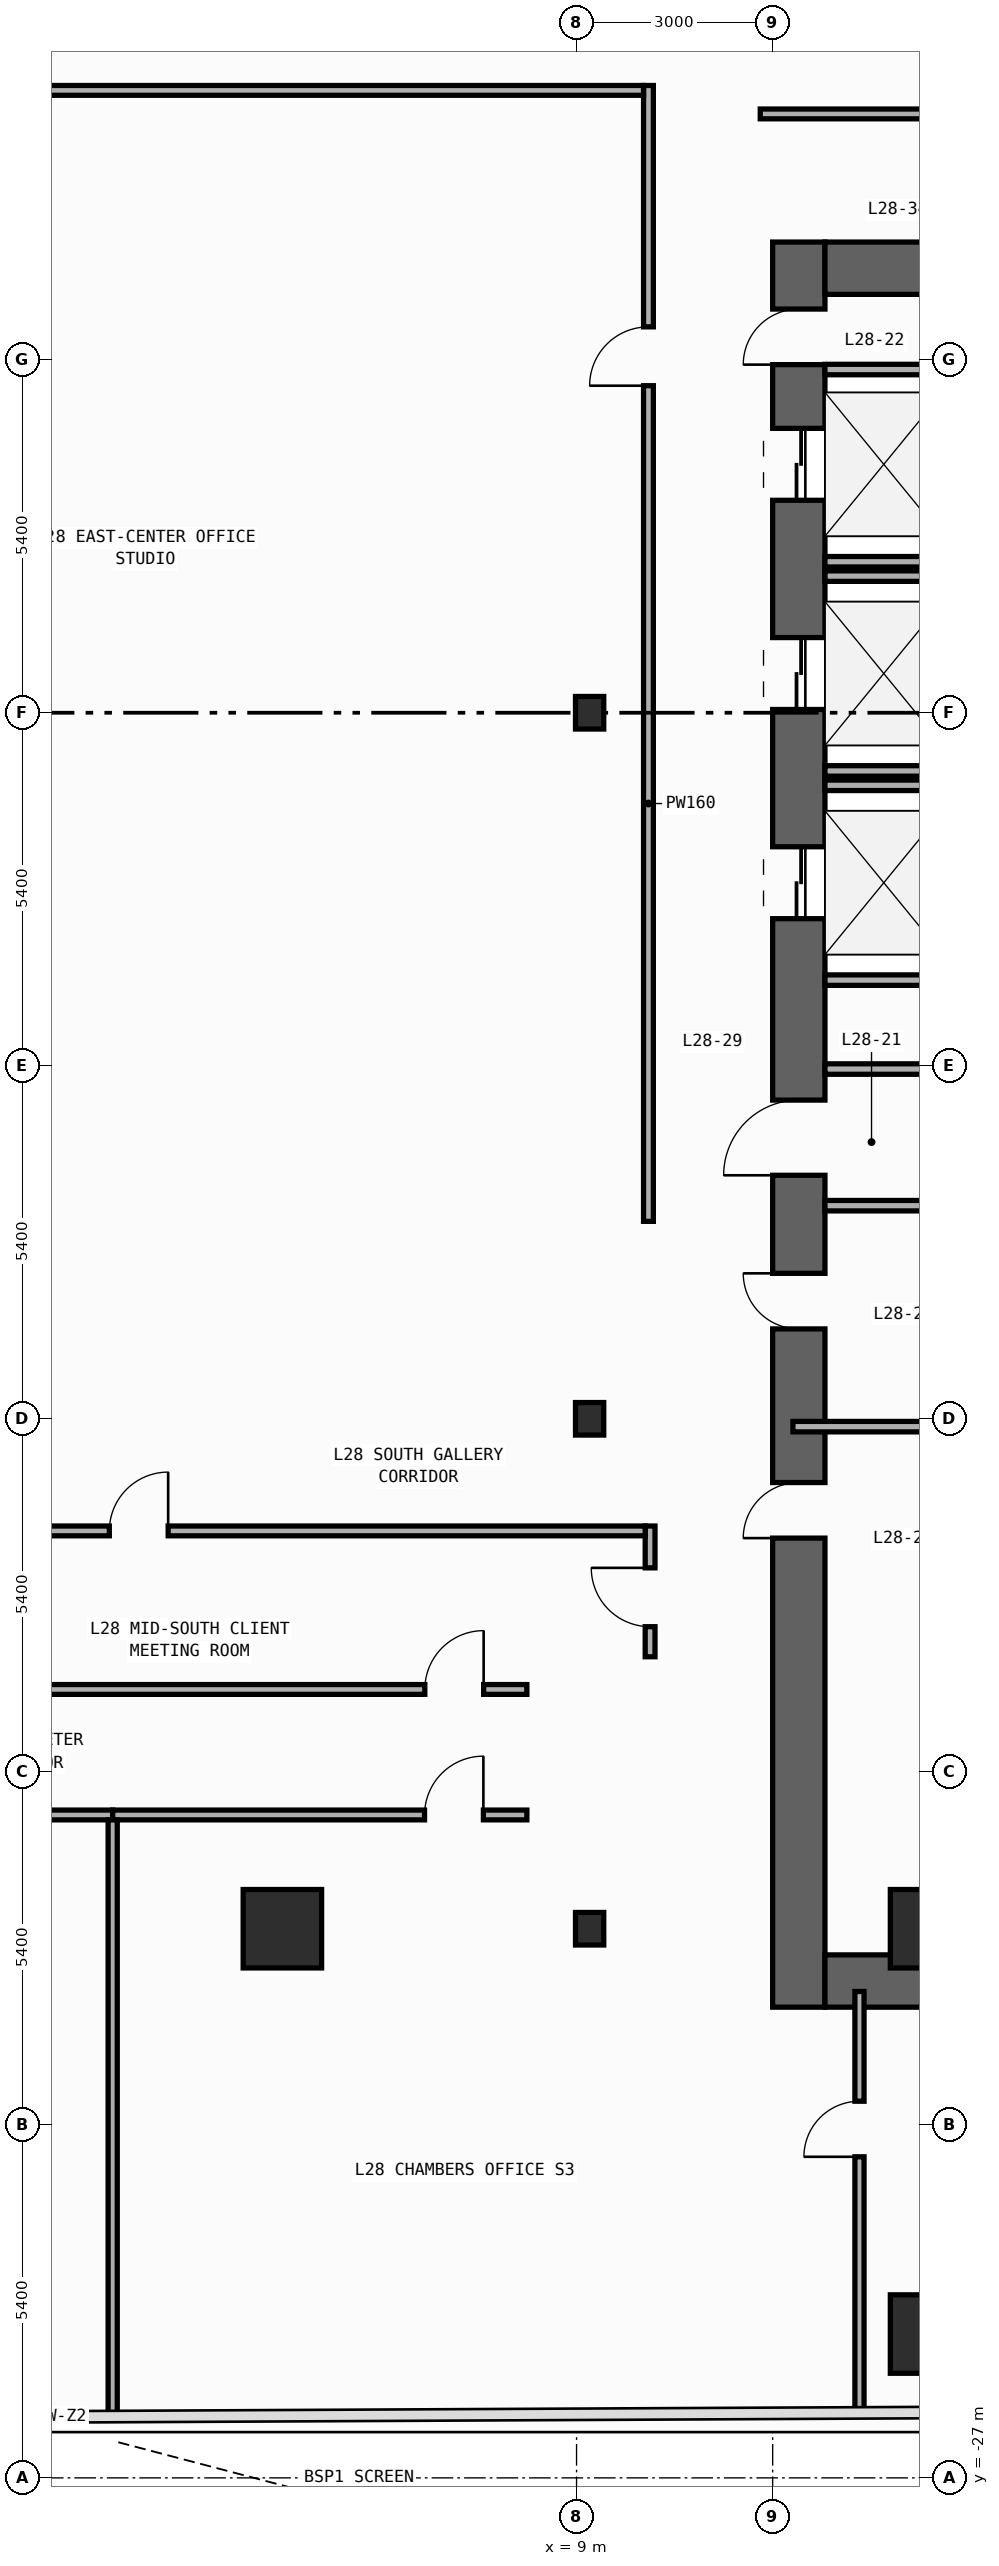
"""IFC4 building model, lengths in metres.
Left out: names, types, materials, properties, quantities, classifications, styles, units other than length and angle.
Written with IfcOpenShell. Run it as: python <this file> out.ifc"""

import sys

from ifc_helpers import new_model, si_unit, direction, frame, frame_2d, origin, origin_2d, place, context, subcontext, project, spatial, rectangle, i_section, extrude, element, fill, save


model = new_model("IFC4")
c1 = context("Model", 3, precision=1e-05, world=origin(), true_north=direction((0.0, 1.0)))
c2 = subcontext(c1, "Body", "Model", "MODEL_VIEW")
j1 = project(units=[si_unit("LENGTHUNIT", "METRE"), si_unit("PLANEANGLEUNIT", "RADIAN")], contexts=[c1])
p1 = place(None, origin())
s1 = spatial("IfcSite", under=j1, at=p1, CompositionType="ELEMENT")
p2 = place(p1, origin())
s2 = spatial("IfcBuilding", under=s1, at=p2, CompositionType="ELEMENT")
p3 = place(p2, frame((0.0, 0.0, 122.6)))
s3 = spatial("IfcBuildingStorey", under=s2, at=p3, CompositionType="ELEMENT", Elevation=122.6)
p4 = place(p3, frame((12.4, -19.8, 0.0), z_axis=(0.0, 0.0, 1.0), x_axis=(0.0, 1.0, 0.0)))
e1 = element("IfcWall", 1, at=p4, inside=s3, PredefinedType="SHEAR", context=c2, shape_type="SweptSolid", body=[
    extrude(rectangle(XDim=27.0, YDim=0.8, at=frame_2d((13.5, 0.0))), origin(), (0.0, 0.0, 1.0), 3.94),
])
p5 = place(p4, frame((23.05, 0.0, 0.0)))
e2 = element("IfcOpeningElement", 2, at=p5, cuts=e1, PredefinedType="OPENING", context=c2, shape_type="SweptSolid", body=[
    extrude(rectangle(XDim=1.1, YDim=2.2, at=frame_2d((0.55, 1.1))), frame((0.0, 0.41, 0.0), z_axis=(0.0, -1.0, 0.0), x_axis=(1.0, 0.0, 0.0)), (0.0, 0.0, 1.0), 0.82),
])
p6 = place(p4, frame((19.85, 0.0, 0.0)))
e3 = element("IfcOpeningElement", 3, at=p6, cuts=e1, PredefinedType="OPENING", context=c2, shape_type="SweptSolid", body=[
    extrude(rectangle(XDim=1.1, YDim=2.2, at=frame_2d((0.55, 1.1))), frame((0.0, 0.41, 0.0), z_axis=(0.0, -1.0, 0.0), x_axis=(1.0, 0.0, 0.0)), (0.0, 0.0, 1.0), 0.82),
])
p7 = place(p4, frame((16.65, 0.0, 0.0)))
e4 = element("IfcOpeningElement", 4, at=p7, cuts=e1, PredefinedType="OPENING", context=c2, shape_type="SweptSolid", body=[
    extrude(rectangle(XDim=1.1, YDim=2.2, at=frame_2d((0.55, 1.1))), frame((0.0, 0.41, 0.0), z_axis=(0.0, -1.0, 0.0), x_axis=(1.0, 0.0, 0.0)), (0.0, 0.0, 1.0), 0.82),
])
p8 = place(p4, frame((7.175, 0.0, 0.0)))
e5 = element("IfcOpeningElement", 5, at=p8, cuts=e1, PredefinedType="OPENING", context=c2, shape_type="SweptSolid", body=[
    extrude(rectangle(XDim=0.85, YDim=2.1, at=frame_2d((0.425, 1.05))), frame((0.0, 0.41, 0.0), z_axis=(0.0, -1.0, 0.0), x_axis=(1.0, 0.0, 0.0)), (0.0, 0.0, 1.0), 0.82),
])
p9 = place(p4, frame((10.375, 0.0, 0.0)))
e6 = element("IfcOpeningElement", 6, at=p9, cuts=e1, PredefinedType="OPENING", context=c2, shape_type="SweptSolid", body=[
    extrude(rectangle(XDim=0.85, YDim=2.1, at=frame_2d((0.425, 1.05))), frame((0.0, 0.41, 0.0), z_axis=(0.0, -1.0, 0.0), x_axis=(1.0, 0.0, 0.0)), (0.0, 0.0, 1.0), 0.82),
])
p10 = place(p4, frame((12.725, 0.0, 0.0)))
e7 = element("IfcOpeningElement", 7, at=p10, cuts=e1, PredefinedType="OPENING", context=c2, shape_type="SweptSolid", body=[
    extrude(rectangle(XDim=1.15, YDim=2.2, at=frame_2d((0.575, 1.1))), frame((0.0, 0.41, 0.0), z_axis=(0.0, -1.0, 0.0), x_axis=(1.0, 0.0, 0.0)), (0.0, 0.0, 1.0), 0.82),
])
p11 = place(p4, frame((25.125, 0.0, 0.0)))
e8 = element("IfcOpeningElement", 8, at=p11, cuts=e1, PredefinedType="OPENING", context=c2, shape_type="SweptSolid", body=[
    extrude(rectangle(XDim=0.85, YDim=2.1, at=frame_2d((0.425, 1.05))), frame((0.0, 0.41, 0.0), z_axis=(0.0, -1.0, 0.0), x_axis=(1.0, 0.0, 0.0)), (0.0, 0.0, 1.0), 0.82),
])
for number, where, z_axis, x_axis in (
    (9, (12.8, -19.4, 0.0), (0.0, 0.0, 1.0), (1.0, 0.0, 0.0)),
    (10, (12.8, 6.8, 0.0), (0.0, 0.0, 1.0), (1.0, 0.0, 0.0)),
):
    element("IfcWall", number, at=place(p3, frame(where, z_axis=z_axis, x_axis=x_axis)), inside=s3, PredefinedType="SHEAR", context=c2, shape_type="SweptSolid", body=[
        extrude(rectangle(XDim=6.8, YDim=0.8, at=frame_2d((3.4, 0.0))), origin(), (0.0, 0.0, 1.0), 3.94),
    ])
for number, where, z_axis, x_axis in (
    (11, (9.2, -18.6, 0.0), (0.0, 0.0, 1.0), (1.0, 0.0, 0.0)),
    (12, (9.2, -10.8, 0.0), (0.0, 0.0, 1.0), (1.0, 0.0, 0.0)),
    (13, (9.2, 0.0, 0.0), (0.0, 0.0, 1.0), (1.0, 0.0, 0.0)),
):
    element("IfcColumn", number, at=place(p3, frame(where, z_axis=z_axis, x_axis=x_axis)), inside=s3, PredefinedType="COLUMN", context=c2, shape_type="SweptSolid", body=[
        extrude(i_section(OverallWidth=0.432, OverallDepth=0.498, WebThickness=0.045, FlangeThickness=0.07, FilletRadius=0.022, at=origin_2d()), origin(), (0.0, 0.0, 1.0), 4.2),
    ])
for number, where, z_axis, x_axis in (
    (14, (14.4, -18.6, 0.0), (0.0, 0.0, 1.0), (1.0, 0.0, 0.0)),
    (15, (4.5, -18.6, 0.0), (0.0, 0.0, 1.0), (1.0, 0.0, 0.0)),
    (16, (14.4, -24.8, 0.0), (0.0, 0.0, 1.0), (1.0, 0.0, 0.0)),
):
    element("IfcColumn", number, at=place(p3, frame(where, z_axis=z_axis, x_axis=x_axis)), inside=s3, PredefinedType="COLUMN", context=c2, shape_type="SweptSolid", body=[
        extrude(rectangle(XDim=1.2, YDim=1.2, at=origin_2d()), origin(), (0.0, 0.0, 1.0), 4.2),
    ])
for number, where, z_axis, x_axis in (
    (17, (12.8, 2.31, 0.0), (0.0, 0.0, 1.0), (1.0, 0.0, 0.0)),
    (18, (12.8, -0.89, 0.0), (0.0, 0.0, 1.0), (1.0, 0.0, 0.0)),
    (19, (12.8, 2.09, 0.0), (0.0, 0.0, 1.0), (1.0, 0.0, 0.0)),
    (20, (12.8, -4.09, 0.0), (0.0, 0.0, 1.0), (1.0, 0.0, 0.0)),
    (21, (12.8, -1.11, 0.0), (0.0, 0.0, 1.0), (1.0, 0.0, 0.0)),
):
    element("IfcWall", number, at=place(p3, frame(where, z_axis=z_axis, x_axis=x_axis)), inside=s3, PredefinedType="STANDARD", context=c2, shape_type="SweptSolid", body=[
        extrude(rectangle(XDim=2.19, YDim=0.16, at=frame_2d((1.095, 0.0))), origin(), (0.0, 0.0, 1.0), 3.94),
    ])
for number, where, z_axis, x_axis in (
    (22, (12.8, -5.45, 0.0), (0.0, 0.0, 1.0), (1.0, 0.0, 0.0)),
    (23, (12.8, -7.54, 0.0), (0.0, 0.0, 1.0), (1.0, 0.0, 0.0)),
    (24, (12.8, 5.25, 0.0), (0.0, 0.0, 1.0), (1.0, 0.0, 0.0)),
):
    element("IfcWall", number, at=place(p3, frame(where, z_axis=z_axis, x_axis=x_axis)), inside=s3, PredefinedType="STANDARD", context=c2, shape_type="SweptSolid", body=[
        extrude(rectangle(XDim=2.6, YDim=0.16, at=frame_2d((1.3, 0.0))), origin(), (0.0, 0.0, 1.0), 3.94),
    ])
p12 = place(p3, frame((12.31, -10.92, 0.0), z_axis=(0.0, 0.0, 1.0), x_axis=(1.0, 0.0, 0.0)))
e25 = element("IfcWall", 25, at=p12, inside=s3, PredefinedType="PARTITIONING", context=c2, shape_type="SweptSolid", body=[
    extrude(rectangle(XDim=3.065, YDim=0.16, at=frame_2d((1.532, 0.0))), origin(), (0.0, 0.0, 1.0), 3.24),
])
p13 = place(p3, frame((10.1, -7.78, 0.0), z_axis=(0.0, 0.0, 1.0), x_axis=(0.0, 1.0, 0.0)))
e26 = element("IfcWall", 26, at=p13, inside=s3, PredefinedType="PARTITIONING", context=c2, shape_type="SweptSolid", body=[
    extrude(rectangle(XDim=17.375, YDim=0.15, at=frame_2d((8.688, 0.0))), origin(), (0.0, 0.0, 1.0), 3.94),
])
p14 = place(p13, frame((12.783, 0.0, 0.0)))
e27 = element("IfcOpeningElement", 27, at=p14, cuts=e26, PredefinedType="OPENING", context=c2, shape_type="SweptSolid", body=[
    extrude(rectangle(XDim=0.9, YDim=2.15, at=frame_2d((0.45, 1.075))), frame((0.0, 0.085, 0.0), z_axis=(0.0, -1.0, 0.0), x_axis=(1.0, 0.0, 0.0)), (0.0, 0.0, 1.0), 0.17),
])
p15 = place(p3, frame((10.125, -14.44, 0.0), z_axis=(0.0, 0.0, 1.0), x_axis=(0.0, 1.0, 0.0)))
e28 = element("IfcWall", 28, at=p15, inside=s3, PredefinedType="PARTITIONING", context=c2, shape_type="SweptSolid", body=[
    extrude(rectangle(XDim=2.0, YDim=0.15, at=frame_2d((1.0, 0.0))), origin(), (0.0, 0.0, 1.0), 3.94),
])
p16 = place(p15, frame((0.46, 0.0, 0.0)))
e29 = element("IfcOpeningElement", 29, at=p16, cuts=e28, PredefinedType="OPENING", context=c2, shape_type="SweptSolid", body=[
    extrude(rectangle(XDim=0.9, YDim=2.15, at=frame_2d((0.45, 1.075))), frame((0.0, 0.085, 0.0), z_axis=(0.0, -1.0, 0.0), x_axis=(1.0, 0.0, 0.0)), (0.0, 0.0, 1.0), 0.17),
])
p17 = place(p3, frame((-4.82, 9.52, 0.0), z_axis=(0.0, 0.0, 1.0), x_axis=(1.0, 0.0, 0.0)))
e30 = element("IfcWall", 30, at=p17, inside=s3, PredefinedType="PARTITIONING", context=c2, shape_type="SweptSolid", body=[
    extrude(rectangle(XDim=14.845, YDim=0.15, at=frame_2d((7.422, 0.0))), origin(), (0.0, 0.0, 1.0), 3.94),
])
p18 = place(p17, frame((3.866, 0.0, 0.0)))
e31 = element("IfcOpeningElement", 31, at=p18, cuts=e30, PredefinedType="OPENING", context=c2, shape_type="SweptSolid", body=[
    extrude(rectangle(XDim=0.9, YDim=2.15, at=frame_2d((0.45, 1.075))), frame((0.0, 0.085, 0.0), z_axis=(0.0, -1.0, 0.0), x_axis=(1.0, 0.0, 0.0)), (0.0, 0.0, 1.0), 0.17),
])
p19 = place(p3, frame((-0.015, -12.515, 0.0), z_axis=(0.0, 0.0, 1.0), x_axis=(1.0, 0.0, 0.0)))
e32 = element("IfcWall", 32, at=p19, inside=s3, PredefinedType="PARTITIONING", context=c2, shape_type="SweptSolid", body=[
    extrude(rectangle(XDim=10.065, YDim=0.15, at=frame_2d((5.032, 0.0))), origin(), (0.0, 0.0, 1.0), 3.94),
])
p20 = place(p19, frame((1.868, 0.0, 0.0)))
e33 = element("IfcOpeningElement", 33, at=p20, cuts=e32, PredefinedType="OPENING", context=c2, shape_type="SweptSolid", body=[
    extrude(rectangle(XDim=0.9, YDim=2.15, at=frame_2d((0.45, 1.075))), frame((0.0, 0.085, 0.0), z_axis=(0.0, -1.0, 0.0), x_axis=(1.0, 0.0, 0.0)), (0.0, 0.0, 1.0), 0.17),
])
p21 = place(p3, frame((11.81, 9.16, 0.0), z_axis=(0.0, 0.0, 1.0), x_axis=(1.0, 0.0, 0.0)))
e34 = element("IfcWall", 34, at=p21, inside=s3, PredefinedType="PARTITIONING", context=c2, shape_type="SweptSolid", body=[
    extrude(rectangle(XDim=8.83, YDim=0.15, at=frame_2d((4.415, 0.0))), origin(), (0.0, 0.0, 1.0), 3.94),
])
p22 = place(p21, frame((5.067, 0.0, 0.0)))
e35 = element("IfcOpeningElement", 35, at=p22, cuts=e34, PredefinedType="OPENING", context=c2, shape_type="SweptSolid", body=[
    extrude(rectangle(XDim=0.9, YDim=2.15, at=frame_2d((0.45, 1.075))), frame((0.0, 0.085, 0.0), z_axis=(0.0, -1.0, 0.0), x_axis=(1.0, 0.0, 0.0)), (0.0, 0.0, 1.0), 0.17),
])
p23 = place(p3, frame((-8.24, -16.86, 0.0), z_axis=(0.0, 0.0, 1.0), x_axis=(1.0, 0.0, 0.0)))
e36 = element("IfcWall", 36, at=p23, inside=s3, PredefinedType="PARTITIONING", context=c2, shape_type="SweptSolid", body=[
    extrude(rectangle(XDim=10.144, YDim=0.15, at=frame_2d((5.072, 0.0))), origin(), (0.0, 0.0, 1.0), 3.94),
])
p24 = place(p23, frame((0.663, 0.0, 0.0)))
e37 = element("IfcOpeningElement", 37, at=p24, cuts=e36, PredefinedType="OPENING", context=c2, shape_type="SweptSolid", body=[
    extrude(rectangle(XDim=0.9, YDim=2.15, at=frame_2d((0.45, 1.075))), frame((0.0, 0.085, 0.0), z_axis=(0.0, -1.0, 0.0), x_axis=(1.0, 0.0, 0.0)), (0.0, 0.0, 1.0), 0.17),
])
p25 = place(p3, frame((1.904, -16.86, 0.0), z_axis=(0.0, 0.0, 1.0), x_axis=(1.0, 0.0, 0.0)))
e38 = element("IfcWall", 38, at=p25, inside=s3, PredefinedType="PARTITIONING", context=c2, shape_type="SweptSolid", body=[
    extrude(rectangle(XDim=6.336, YDim=0.15, at=frame_2d((3.168, 0.0))), origin(), (0.0, 0.0, 1.0), 3.94),
])
p26 = place(p25, frame((4.771, 0.0, 0.0)))
e39 = element("IfcOpeningElement", 39, at=p26, cuts=e38, PredefinedType="OPENING", context=c2, shape_type="SweptSolid", body=[
    extrude(rectangle(XDim=0.9, YDim=2.15, at=frame_2d((0.45, 1.075))), frame((0.0, 0.085, 0.0), z_axis=(0.0, -1.0, 0.0), x_axis=(1.0, 0.0, 0.0)), (0.0, 0.0, 1.0), 0.17),
])
p27 = place(p3, frame((-0.015, -14.94, 0.0), z_axis=(0.0, 0.0, 1.0), x_axis=(1.0, 0.0, 0.0)))
e40 = element("IfcWall", 40, at=p27, inside=s3, PredefinedType="PARTITIONING", context=c2, shape_type="SweptSolid", body=[
    extrude(rectangle(XDim=8.255, YDim=0.15, at=frame_2d((4.127, 0.0))), origin(), (0.0, 0.0, 1.0), 3.94),
])
p28 = place(p27, frame((6.694, 0.0, 0.0)))
e41 = element("IfcOpeningElement", 41, at=p28, cuts=e40, PredefinedType="OPENING", context=c2, shape_type="SweptSolid", body=[
    extrude(rectangle(XDim=0.9, YDim=2.15, at=frame_2d((0.45, 1.075))), frame((0.0, 0.085, 0.0), z_axis=(0.0, -1.0, 0.0), x_axis=(1.0, 0.0, 0.0)), (0.0, 0.0, 1.0), 0.17),
])
p29 = place(p3, frame((1.904, -26.057, 0.0), z_axis=(0.0, 0.0, 1.0), x_axis=(0.0, 1.0, 0.0)))
e42 = element("IfcWall", 42, at=p29, inside=s3, PredefinedType="PARTITIONING", context=c2, shape_type="SweptSolid", body=[
    extrude(rectangle(XDim=9.122, YDim=0.14, at=frame_2d((4.561, 0.0))), origin(), (0.0, 0.0, 1.0), 3.94),
])
p30 = place(p3, frame((13.328, -26.001, 0.0), z_axis=(0.0, 0.0, 1.0), x_axis=(0.0, 1.0, 0.0)))
e43 = element("IfcWall", 43, at=p30, inside=s3, PredefinedType="PARTITIONING", context=c2, shape_type="SweptSolid", body=[
    extrude(rectangle(XDim=6.441, YDim=0.14, at=frame_2d((3.221, 0.0))), origin(), (0.0, 0.0, 1.0), 3.94),
])
p31 = place(p30, frame((3.913, 0.0, 0.0)))
e44 = element("IfcOpeningElement", 44, at=p31, cuts=e43, PredefinedType="OPENING", context=c2, shape_type="SweptSolid", body=[
    extrude(rectangle(XDim=0.85, YDim=2.1, at=frame_2d((0.425, 1.05))), frame((0.0, 0.08, 0.0), z_axis=(0.0, -1.0, 0.0), x_axis=(1.0, 0.0, 0.0)), (0.0, 0.0, 1.0), 0.16),
])
p32 = place(p5, origin())
e45 = element("IfcDoor", 45, at=p32, inside=s3, OperationType="DOUBLE_DOOR_SLIDING", PredefinedType="DOOR", context=c2, shape_type="SweptSolid", body=[
    extrude(rectangle(XDim=1.1, YDim=2.2, at=frame_2d((0.55, 1.1))), frame((0.0, 0.025, 0.0), z_axis=(0.0, -1.0, 0.0), x_axis=(1.0, 0.0, 0.0)), (0.0, 0.0, 1.0), 0.05),
])
fill(e2, e45)
p33 = place(p6, origin())
e46 = element("IfcDoor", 46, at=p33, inside=s3, OperationType="DOUBLE_DOOR_SLIDING", PredefinedType="DOOR", context=c2, shape_type="SweptSolid", body=[
    extrude(rectangle(XDim=1.1, YDim=2.2, at=frame_2d((0.55, 1.1))), frame((0.0, 0.025, 0.0), z_axis=(0.0, -1.0, 0.0), x_axis=(1.0, 0.0, 0.0)), (0.0, 0.0, 1.0), 0.05),
])
fill(e3, e46)
p34 = place(p7, origin())
e47 = element("IfcDoor", 47, at=p34, inside=s3, OperationType="DOUBLE_DOOR_SLIDING", PredefinedType="DOOR", context=c2, shape_type="SweptSolid", body=[
    extrude(rectangle(XDim=1.1, YDim=2.2, at=frame_2d((0.55, 1.1))), frame((0.0, 0.025, 0.0), z_axis=(0.0, -1.0, 0.0), x_axis=(1.0, 0.0, 0.0)), (0.0, 0.0, 1.0), 0.05),
])
fill(e4, e47)
p35 = place(p8, origin())
e48 = element("IfcDoor", 48, at=p35, inside=s3, OperationType="SINGLE_SWING_LEFT", PredefinedType="DOOR", context=c2, shape_type="SweptSolid", body=[
    extrude(rectangle(XDim=0.85, YDim=2.1, at=frame_2d((0.425, 1.05))), frame((0.0, 0.025, 0.0), z_axis=(0.0, -1.0, 0.0), x_axis=(1.0, 0.0, 0.0)), (0.0, 0.0, 1.0), 0.05),
])
fill(e5, e48)
p36 = place(p9, origin())
e49 = element("IfcDoor", 49, at=p36, inside=s3, OperationType="SINGLE_SWING_RIGHT", PredefinedType="DOOR", context=c2, shape_type="SweptSolid", body=[
    extrude(rectangle(XDim=0.85, YDim=2.1, at=frame_2d((0.425, 1.05))), frame((0.0, 0.025, 0.0), z_axis=(0.0, -1.0, 0.0), x_axis=(1.0, 0.0, 0.0)), (0.0, 0.0, 1.0), 0.05),
])
fill(e6, e49)
p37 = place(p10, origin())
e50 = element("IfcDoor", 50, at=p37, inside=s3, OperationType="SINGLE_SWING_LEFT", PredefinedType="DOOR", context=c2, shape_type="SweptSolid", body=[
    extrude(rectangle(XDim=1.15, YDim=2.2, at=frame_2d((0.575, 1.1))), frame((0.0, 0.025, 0.0), z_axis=(0.0, -1.0, 0.0), x_axis=(1.0, 0.0, 0.0)), (0.0, 0.0, 1.0), 0.05),
])
fill(e7, e50)
p38 = place(p11, origin())
e51 = element("IfcDoor", 51, at=p38, inside=s3, OperationType="SINGLE_SWING_LEFT", PredefinedType="DOOR", context=c2, shape_type="SweptSolid", body=[
    extrude(rectangle(XDim=0.85, YDim=2.1, at=frame_2d((0.425, 1.05))), frame((0.0, 0.025, 0.0), z_axis=(0.0, -1.0, 0.0), x_axis=(1.0, 0.0, 0.0)), (0.0, 0.0, 1.0), 0.05),
])
fill(e8, e51)
p39 = place(p14, origin())
e52 = element("IfcDoor", 52, at=p39, inside=s3, OperationType="SINGLE_SWING_LEFT", PredefinedType="DOOR", context=c2, shape_type="SweptSolid", body=[
    extrude(rectangle(XDim=0.9, YDim=2.15, at=frame_2d((0.45, 1.075))), frame((0.0, 0.025, 0.0), z_axis=(0.0, -1.0, 0.0), x_axis=(1.0, 0.0, 0.0)), (0.0, 0.0, 1.0), 0.05),
])
fill(e27, e52)
p40 = place(p16, origin())
e53 = element("IfcDoor", 53, at=p40, inside=s3, OperationType="SINGLE_SWING_RIGHT", PredefinedType="DOOR", context=c2, shape_type="SweptSolid", body=[
    extrude(rectangle(XDim=0.9, YDim=2.15, at=frame_2d((0.45, 1.075))), frame((0.0, 0.025, 0.0), z_axis=(0.0, -1.0, 0.0), x_axis=(1.0, 0.0, 0.0)), (0.0, 0.0, 1.0), 0.05),
])
fill(e29, e53)
p41 = place(p20, origin())
e54 = element("IfcDoor", 54, at=p41, inside=s3, OperationType="SINGLE_SWING_RIGHT", PredefinedType="DOOR", context=c2, shape_type="SweptSolid", body=[
    extrude(rectangle(XDim=0.9, YDim=2.15, at=frame_2d((0.45, 1.075))), frame((0.0, 0.025, 0.0), z_axis=(0.0, -1.0, 0.0), x_axis=(1.0, 0.0, 0.0)), (0.0, 0.0, 1.0), 0.05),
])
fill(e33, e54)
p42 = place(p26, origin())
e55 = element("IfcDoor", 55, at=p42, inside=s3, OperationType="SINGLE_SWING_RIGHT", PredefinedType="DOOR", context=c2, shape_type="SweptSolid", body=[
    extrude(rectangle(XDim=0.9, YDim=2.15, at=frame_2d((0.45, 1.075))), frame((0.0, 0.025, 0.0), z_axis=(0.0, -1.0, 0.0), x_axis=(1.0, 0.0, 0.0)), (0.0, 0.0, 1.0), 0.05),
])
fill(e39, e55)
p43 = place(p28, origin())
e56 = element("IfcDoor", 56, at=p43, inside=s3, OperationType="SINGLE_SWING_RIGHT", PredefinedType="DOOR", context=c2, shape_type="SweptSolid", body=[
    extrude(rectangle(XDim=0.9, YDim=2.15, at=frame_2d((0.45, 1.075))), frame((0.0, 0.025, 0.0), z_axis=(0.0, -1.0, 0.0), x_axis=(1.0, 0.0, 0.0)), (0.0, 0.0, 1.0), 0.05),
])
fill(e41, e56)
p44 = place(p31, origin())
e57 = element("IfcDoor", 57, at=p44, inside=s3, OperationType="SINGLE_SWING_LEFT", PredefinedType="DOOR", context=c2, shape_type="SweptSolid", body=[
    extrude(rectangle(XDim=0.85, YDim=2.1, at=frame_2d((0.425, 1.05))), frame((0.0, 0.025, 0.0), z_axis=(0.0, -1.0, 0.0), x_axis=(1.0, 0.0, 0.0)), (0.0, 0.0, 1.0), 0.05),
])
fill(e44, e57)
save(model, sys.argv[1])
